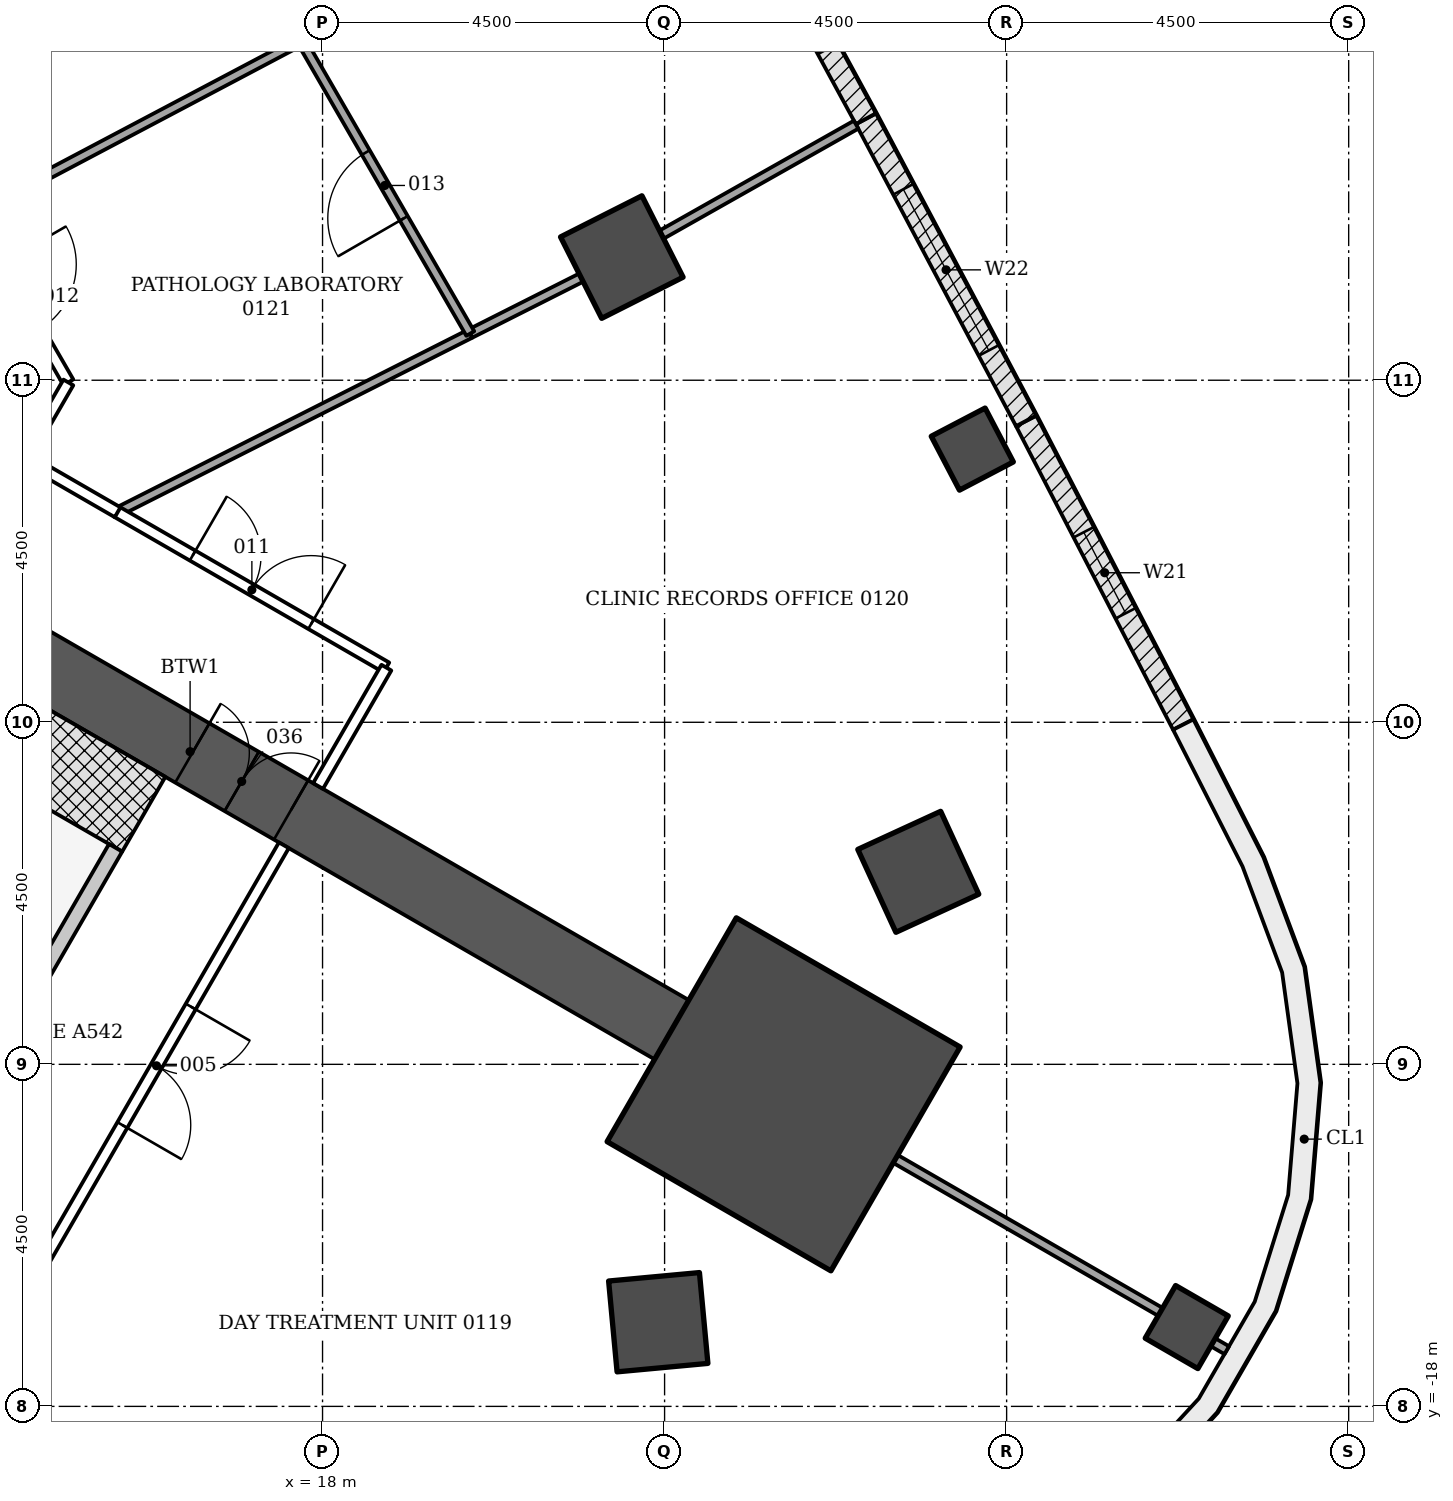
"""IFC4 building model, lengths in metres.
Left out: names, types, materials, properties, quantities, classifications, styles, units other than length and angle.
Written with IfcOpenShell. Run it as: python <this file> out.ifc"""

import sys

from ifc_helpers import new_model, si_unit, direction, frame, frame_2d, origin, origin_2d, place, context, subcontext, project, spatial, polyline, rectangle, outline, extrude, element, fill, save


model = new_model("IFC4")
c1 = context("Model", 3, precision=1e-05, world=origin(), true_north=direction((0.0, 1.0)))
c2 = subcontext(c1, "Body", "Model", "MODEL_VIEW")
j1 = project(units=[si_unit("LENGTHUNIT", "METRE"), si_unit("PLANEANGLEUNIT", "RADIAN")], contexts=[c1])
p1 = place(None, origin())
s1 = spatial("IfcSite", under=j1, at=p1, CompositionType="ELEMENT")
p2 = place(p1, origin())
s2 = spatial("IfcBuilding", under=s1, at=p2, CompositionType="ELEMENT")
p3 = place(p2, frame((0.0, 0.0, 6.0)))
s3 = spatial("IfcBuildingStorey", under=s2, at=p3, CompositionType="ELEMENT", Elevation=6.0)
for number, where, z_axis, x_axis in (
    (1, (22.417, -16.893, -0.25), (0.0, 0.0, 1.0), (0.093, -0.996, 0.0)),
    (2, (25.838, -10.967, -0.25), (0.0, 0.0, 1.0), (0.909, 0.418, 0.0)),
    (3, (21.937, -2.88, -0.25), (0.0, 0.0, 1.0), (0.893, 0.451, 0.0)),
):
    element("IfcColumn", number, at=place(p3, frame(where, z_axis=z_axis, x_axis=x_axis)), inside=s3, PredefinedType="COLUMN", context=c2, shape_type="SweptSolid", body=[
        extrude(rectangle(XDim=1.2, YDim=1.2, at=origin_2d()), origin(), (0.0, 0.0, 1.0), 4.5),
    ])
for number, where, z_axis, x_axis in (
    (4, (29.37, -16.957, -0.25), (0.0, 0.0, 1.0), (0.866, -0.5, 0.0)),
    (5, (26.548, -5.406, -0.25), (0.0, 0.0, 1.0), (0.886, 0.464, 0.0)),
):
    element("IfcColumn", number, at=place(p3, frame(where, z_axis=z_axis, x_axis=x_axis)), inside=s3, PredefinedType="COLUMN", context=c2, shape_type="SweptSolid", body=[
        extrude(rectangle(XDim=0.8, YDim=0.8, at=origin_2d()), origin(), (0.0, 0.0, 1.0), 4.5),
    ])
p4 = place(p3, frame((9.922, -5.728, -0.25), z_axis=(0.0, 0.0, 1.0), x_axis=(0.866028046028, -0.499995423472, 0.0)))
e6 = element("IfcWall", 6, at=p4, inside=s3, PredefinedType="SHEAR", context=c2, shape_type="SweptSolid", body=[
    extrude(rectangle(XDim=14.633, YDim=0.9, at=frame_2d((7.316, 0.0))), origin(), (0.0, 0.0, 1.0), 4.5),
])
p5 = place(p4, frame((7.35, 0.0, 0.25)))
e7 = element("IfcOpeningElement", 7, at=p5, cuts=e6, PredefinedType="OPENING", context=c2, shape_type="SweptSolid", body=[
    extrude(rectangle(XDim=1.5, YDim=2.1, at=frame_2d((0.75, 1.05))), frame((0.0, 0.46, 0.0), z_axis=(0.0, -1.0, 0.0), x_axis=(1.0, 0.0, 0.0)), (0.0, 0.0, 1.0), 0.92),
])
p6 = place(p3, frame((24.066, -13.895, -0.25), z_axis=(0.0, 0.0, 1.0), x_axis=(0.866025403784, -0.5, 0.0)))
e8 = element("IfcColumn", 8, at=p6, inside=s3, PredefinedType="COLUMN", context=c2, shape_type="SweptSolid", body=[
    extrude(rectangle(XDim=3.4, YDim=3.4, at=origin_2d()), origin(), (0.0, 0.0, 1.0), 4.5),
])
p7 = place(p3, frame((27.258, -5.036, 0.0), z_axis=(0.0, 0.0, 1.0), x_axis=(0.459443600121, -0.888206945654, 0.0)))
e9 = element("IfcWall", 9, at=p7, inside=s3, PredefinedType="NOTDEFINED", context=c2, shape_type="SweptSolid", body=[
    extrude(rectangle(XDim=4.496, YDim=0.3, at=frame_2d((2.248, 0.0))), origin(), (0.0, 0.0, 1.0), 4.25),
])
p8 = place(p7, frame((1.648, 0.0, 0.8)))
e10 = element("IfcOpeningElement", 10, at=p8, cuts=e9, PredefinedType="OPENING", context=c2, shape_type="SweptSolid", body=[
    extrude(rectangle(XDim=1.2, YDim=3.0, at=frame_2d((0.6, 1.5))), frame((0.0, 0.16, 0.0), z_axis=(0.0, -1.0, 0.0), x_axis=(1.0, 0.0, 0.0)), (0.0, 0.0, 1.0), 0.32),
])
p9 = place(p3, frame((25.15, -1.062, 0.0), z_axis=(0.0, 0.0, 1.0), x_axis=(0.468566202388, -0.883428386447, 0.0)))
e11 = element("IfcWall", 11, at=p9, inside=s3, PredefinedType="NOTDEFINED", context=c2, shape_type="SweptSolid", body=[
    extrude(rectangle(XDim=4.496, YDim=0.3, at=frame_2d((2.248, 0.0))), origin(), (0.0, 0.0, 1.0), 4.25),
])
p10 = place(p9, frame((1.048, 0.0, 0.9)))
e12 = element("IfcOpeningElement", 12, at=p10, cuts=e11, PredefinedType="OPENING", context=c2, shape_type="SweptSolid", body=[
    extrude(rectangle(XDim=2.4, YDim=2.4, at=frame_2d((1.2, 1.2))), frame((0.0, 0.16, 0.0), z_axis=(0.0, -1.0, 0.0), x_axis=(1.0, 0.0, 0.0)), (0.0, 0.0, 1.0), 0.32),
])
p11 = place(p3, frame((23.001, 2.89, 0.0), z_axis=(0.0, 0.0, 1.0), x_axis=(0.477577109439, -0.878589838628, 0.0)))
e13 = element("IfcWall", 13, at=p11, inside=s3, PredefinedType="NOTDEFINED", context=c2, shape_type="SweptSolid", body=[
    extrude(rectangle(XDim=4.496, YDim=0.3, at=frame_2d((2.248, 0.0))), origin(), (0.0, 0.0, 1.0), 4.25),
])
p12 = place(p11, frame((1.048, 0.0, 0.9)))
e14 = element("IfcOpeningElement", 14, at=p12, cuts=e13, PredefinedType="OPENING", context=c2, shape_type="SweptSolid", body=[
    extrude(rectangle(XDim=2.4, YDim=2.4, at=frame_2d((1.2, 1.2))), frame((0.0, 0.16, 0.0), z_axis=(0.0, -1.0, 0.0), x_axis=(1.0, 0.0, 0.0)), (0.0, 0.0, 1.0), 0.32),
])
p13 = place(p3, origin())
e15 = element("IfcWall", 15, at=p13, inside=s3, PredefinedType="NOTDEFINED", context=c2, shape_type="SweptSolid", body=[
    extrude(outline(polyline([(22.49, -21.03), (24.522, -20.921), (26.04, -20.666), (27.465, -20.086), (28.729, -19.209), (29.771, -18.077), (30.54, -16.744), (31.0, -15.276), (31.128, -13.742), (30.917, -12.218), (30.379, -10.776), (29.457, -8.962), (29.19, -9.098), (30.104, -10.897), (30.625, -12.292), (30.826, -13.75), (30.704, -15.218), (30.264, -16.623), (29.528, -17.898), (28.531, -18.981), (27.321, -19.821), (25.957, -20.376), (24.489, -20.622), (22.474, -20.73), (22.49, -21.03)])), origin(), (0.0, 0.0, 1.0), 4.25),
])
p14 = place(p3, frame((9.413, -6.61, -0.25), z_axis=(0.0, 0.0, 1.0), x_axis=(0.866018442252, -0.500012057535, 0.0)))
e16 = element("IfcWall", 16, at=p14, inside=s3, PredefinedType="SHEAR", context=c2, shape_type="SweptSolid", body=[
    extrude(rectangle(XDim=7.2, YDim=1.136, at=frame_2d((3.6, 0.0))), origin(), (0.0, 0.0, 1.0), 4.5),
])
p15 = place(p3, frame((0.0, 0.0, -0.25)))
e17 = element("IfcWall", 17, at=p15, inside=s3, PredefinedType="SHEAR", context=c2, shape_type="SweptSolid", body=[
    extrude(outline(polyline([(12.104, -13.149), (14.289, -12.563), (15.364, -10.701), (15.191, -10.601), (14.157, -12.392), (12.132, -12.934), (12.204, -12.976), (12.204, -12.976), (12.204, -12.976), (12.204, -12.976), (12.204, -12.976), (12.204, -12.976), (12.204, -12.976), (12.204, -12.976), (12.204, -12.976), (12.204, -12.976), (12.204, -12.976), (12.204, -12.976), (12.204, -12.976), (12.204, -12.976), (12.204, -12.976), (12.204, -12.976), (12.204, -12.976), (12.104, -13.149)])), origin(), (0.0, 0.0, 1.0), 4.5),
])
p16 = place(p3, frame((17.491, -10.618, 0.0), z_axis=(0.0, 0.0, 1.0), x_axis=(-0.499969057507, -0.866043267704, 0.0)))
e18 = element("IfcWall", 18, at=p16, inside=s3, PredefinedType="PARTITIONING", context=c2, shape_type="SweptSolid", body=[
    extrude(rectangle(XDim=6.685, YDim=0.15, at=frame_2d((3.342, 0.0))), origin(), (0.0, 0.0, 1.0), 3.638),
])
p17 = place(p16, frame((2.45, 0.0, 0.0)))
e19 = element("IfcOpeningElement", 19, at=p17, cuts=e18, PredefinedType="OPENING", context=c2, shape_type="SweptSolid", body=[
    extrude(rectangle(XDim=1.8, YDim=2.1, at=frame_2d((0.9, 1.05))), frame((0.0, 0.085, 0.0), z_axis=(0.0, -1.0, 0.0), x_axis=(1.0, 0.0, 0.0)), (0.0, 0.0, 1.0), 0.17),
])
p18 = place(p3, frame((29.023, -16.757, 0.0), z_axis=(0.0, 0.0, 1.0), x_axis=(-0.866027971625, 0.499995552344, 0.0)))
e20 = element("IfcWall", 20, at=p18, inside=s3, PredefinedType="PARTITIONING", context=c2, shape_type="SweptSolid", body=[
    extrude(rectangle(XDim=4.024, YDim=0.12, at=frame_2d((2.012, 0.0))), origin(), (0.0, 0.0, 1.0), 3.717),
])
p19 = place(p3, frame((29.896, -17.261, 0.0), z_axis=(0.0, 0.0, 1.0), x_axis=(-0.865774595023, 0.500434162116, 0.0)))
e21 = element("IfcWall", 21, at=p19, inside=s3, PredefinedType="PARTITIONING", context=c2, shape_type="SweptSolid", body=[
    extrude(rectangle(XDim=0.208, YDim=0.12, at=frame_2d((0.104, 0.0))), origin(), (0.0, 0.0, 1.0), 4.25),
])
p20 = place(p3, frame((19.942, -3.888, 0.0), z_axis=(0.0, 0.0, 1.0), x_axis=(-0.89239982182, -0.451245562877, 0.0)))
e22 = element("IfcWall", 22, at=p20, inside=s3, PredefinedType="PARTITIONING", context=c2, shape_type="SweptSolid", body=[
    extrude(rectangle(XDim=5.201, YDim=0.12, at=frame_2d((2.601, 0.0))), origin(), (0.0, 0.0, 1.0), 3.638),
])
p21 = place(p3, frame((21.401, -3.151, 0.0), z_axis=(0.0, 0.0, 1.0), x_axis=(-0.892653768212, -0.450742997834, 0.0)))
e23 = element("IfcWall", 23, at=p21, inside=s3, PredefinedType="PARTITIONING", context=c2, shape_type="SweptSolid", body=[
    extrude(rectangle(XDim=1.631, YDim=0.12, at=frame_2d((0.815, 0.0))), origin(), (0.0, 0.0, 1.0), 3.638),
])
p22 = place(p3, frame((25.02, -1.138, 0.0), z_axis=(0.0, 0.0, 1.0), x_axis=(-0.870620069476, -0.491955988505, 0.0)))
e24 = element("IfcWall", 24, at=p22, inside=s3, PredefinedType="PARTITIONING", context=c2, shape_type="SweptSolid", body=[
    extrude(rectangle(XDim=2.939, YDim=0.12, at=frame_2d((1.47, 0.0))), origin(), (0.0, 0.0, 1.0), 3.633),
])
p23 = place(p3, frame((15.295, -6.232, 0.0), z_axis=(0.0, 0.0, 1.0), x_axis=(0.865991915229, -0.500057999394, 0.0)))
e25 = element("IfcWall", 25, at=p23, inside=s3, PredefinedType="PARTITIONING", context=c2, shape_type="SweptSolid", body=[
    extrude(rectangle(XDim=4.094, YDim=0.15, at=frame_2d((2.047, 0.0))), origin(), (0.0, 0.0, 1.0), 3.638),
])
p24 = place(p23, frame((1.15, 0.0, 0.0)))
e26 = element("IfcOpeningElement", 26, at=p24, cuts=e25, PredefinedType="OPENING", context=c2, shape_type="SweptSolid", body=[
    extrude(rectangle(XDim=1.8, YDim=2.1, at=frame_2d((0.9, 1.05))), frame((0.0, 0.085, 0.0), z_axis=(0.0, -1.0, 0.0), x_axis=(1.0, 0.0, 0.0)), (0.0, 0.0, 1.0), 0.17),
])
p25 = place(p3, frame((18.84, -8.281, 0.0), z_axis=(0.0, 0.0, 1.0), x_axis=(-0.500126010714, -0.86595263924, 0.0)))
e27 = element("IfcWall", 27, at=p25, inside=s3, PredefinedType="PARTITIONING", context=c2, shape_type="SweptSolid", body=[
    extrude(rectangle(XDim=1.798, YDim=0.15, at=frame_2d((0.899, 0.0))), origin(), (0.0, 0.0, 1.0), 3.638),
])
p26 = place(p3, frame((19.944, -3.886, 0.0), z_axis=(0.0, 0.0, 1.0), x_axis=(-0.500092923031, 0.865971748, 0.0)))
e28 = element("IfcWall", 28, at=p26, inside=s3, PredefinedType="PARTITIONING", context=c2, shape_type="SweptSolid", body=[
    extrude(rectangle(XDim=4.449, YDim=0.12, at=frame_2d((2.225, 0.0))), origin(), (0.0, 0.0, 1.0), 3.638),
])
p27 = place(p26, frame((1.75, 0.0, 0.0)))
e29 = element("IfcOpeningElement", 29, at=p27, cuts=e28, PredefinedType="OPENING", context=c2, shape_type="SweptSolid", body=[
    extrude(rectangle(XDim=1.0, YDim=2.1, at=frame_2d((0.5, 1.05))), frame((0.0, 0.07, 0.0), z_axis=(0.0, -1.0, 0.0), x_axis=(1.0, 0.0, 0.0)), (0.0, 0.0, 1.0), 0.14),
])
p28 = place(p3, frame((17.717, -0.034, 0.0), z_axis=(0.0, 0.0, 1.0), x_axis=(-0.884117284138, -0.467265051003, 0.0)))
e30 = element("IfcWall", 30, at=p28, inside=s3, PredefinedType="PARTITIONING", context=c2, shape_type="SweptSolid", body=[
    extrude(rectangle(XDim=4.901, YDim=0.12, at=frame_2d((2.45, 0.0))), origin(), (0.0, 0.0, 1.0), 3.638),
])
p29 = place(p3, frame((13.385, -2.326, 0.0), z_axis=(0.0, 0.0, 1.0), x_axis=(0.500043940957, -0.866000032975, 0.0)))
e31 = element("IfcWall", 31, at=p29, inside=s3, PredefinedType="PARTITIONING", context=c2, shape_type="SweptSolid", body=[
    extrude(rectangle(XDim=2.542, YDim=0.15, at=frame_2d((1.271, 0.0))), origin(), (0.0, 0.0, 1.0), 3.638),
])
p30 = place(p29, frame((0.75, 0.0, 0.0)))
e32 = element("IfcOpeningElement", 32, at=p30, cuts=e31, PredefinedType="OPENING", context=c2, shape_type="SweptSolid", body=[
    extrude(rectangle(XDim=1.0, YDim=2.1, at=frame_2d((0.5, 1.05))), frame((0.0, 0.085, 0.0), z_axis=(0.0, -1.0, 0.0), x_axis=(1.0, 0.0, 0.0)), (0.0, 0.0, 1.0), 0.17),
])
p31 = place(p3, frame((14.656, -4.529, 0.0), z_axis=(0.0, 0.0, 1.0), x_axis=(-0.500502949238, -0.865734831114, 0.0)))
e33 = element("IfcWall", 33, at=p31, inside=s3, PredefinedType="PARTITIONING", context=c2, shape_type="SweptSolid", body=[
    extrude(rectangle(XDim=1.155, YDim=0.15, at=frame_2d((0.578, 0.0))), origin(), (0.0, 0.0, 1.0), 4.25),
])
p32 = place(p3, frame((14.078, -5.529, 0.0), z_axis=(0.0, 0.0, 1.0), x_axis=(0.865984561414, -0.500070734389, 0.0)))
e34 = element("IfcWall", 34, at=p32, inside=s3, PredefinedType="PARTITIONING", context=c2, shape_type="SweptSolid", body=[
    extrude(rectangle(XDim=1.416, YDim=0.15, at=frame_2d((0.708, 0.0))), origin(), (0.0, 0.0, 1.0), 3.638),
])
p33 = place(p8, origin())
e35 = element("IfcWindow", 35, at=p33, inside=s3, PartitioningType="SINGLE_PANEL", PredefinedType="WINDOW", context=c2, shape_type="SweptSolid", body=[
    extrude(rectangle(XDim=1.2, YDim=3.0, at=frame_2d((0.6, 1.5))), frame((0.0, 0.03, 0.0), z_axis=(0.0, -1.0, 0.0), x_axis=(1.0, 0.0, 0.0)), (0.0, 0.0, 1.0), 0.06),
])
fill(e10, e35)
p34 = place(p10, origin())
e36 = element("IfcWindow", 36, at=p34, inside=s3, PartitioningType="DOUBLE_PANEL_VERTICAL", PredefinedType="WINDOW", context=c2, shape_type="SweptSolid", body=[
    extrude(rectangle(XDim=2.4, YDim=2.4, at=frame_2d((1.2, 1.2))), frame((0.0, 0.03, 0.0), z_axis=(0.0, -1.0, 0.0), x_axis=(1.0, 0.0, 0.0)), (0.0, 0.0, 1.0), 0.06),
])
fill(e12, e36)
p35 = place(p17, origin())
e37 = element("IfcDoor", 37, at=p35, inside=s3, OperationType="DOUBLE_DOOR_SINGLE_SWING", PredefinedType="DOOR", context=c2, shape_type="SweptSolid", body=[
    extrude(rectangle(XDim=1.8, YDim=2.1, at=frame_2d((0.9, 1.05))), frame((0.0, 0.025, 0.0), z_axis=(0.0, -1.0, 0.0), x_axis=(1.0, 0.0, 0.0)), (0.0, 0.0, 1.0), 0.05),
])
fill(e19, e37)
p36 = place(p24, origin())
e38 = element("IfcDoor", 38, at=p36, inside=s3, OperationType="DOUBLE_DOOR_SINGLE_SWING", PredefinedType="DOOR", context=c2, shape_type="SweptSolid", body=[
    extrude(rectangle(XDim=1.8, YDim=2.1, at=frame_2d((0.9, 1.05))), frame((0.0, 0.025, 0.0), z_axis=(0.0, -1.0, 0.0), x_axis=(1.0, 0.0, 0.0)), (0.0, 0.0, 1.0), 0.05),
])
fill(e26, e38)
p37 = place(p27, origin())
e39 = element("IfcDoor", 39, at=p37, inside=s3, OperationType="SINGLE_SWING_LEFT", PredefinedType="DOOR", context=c2, shape_type="SweptSolid", body=[
    extrude(rectangle(XDim=1.0, YDim=2.1, at=frame_2d((0.5, 1.05))), frame((0.0, 0.025, 0.0), z_axis=(0.0, -1.0, 0.0), x_axis=(1.0, 0.0, 0.0)), (0.0, 0.0, 1.0), 0.05),
])
fill(e29, e39)
p38 = place(p5, origin())
e40 = element("IfcDoor", 40, at=p38, inside=s3, OperationType="DOUBLE_DOOR_SINGLE_SWING", PredefinedType="DOOR", context=c2, shape_type="SweptSolid", body=[
    extrude(rectangle(XDim=1.5, YDim=2.1, at=frame_2d((0.75, 1.05))), frame((0.0, 0.025, 0.0), z_axis=(0.0, -1.0, 0.0), x_axis=(1.0, 0.0, 0.0)), (0.0, 0.0, 1.0), 0.05),
])
fill(e7, e40)
save(model, sys.argv[1])
